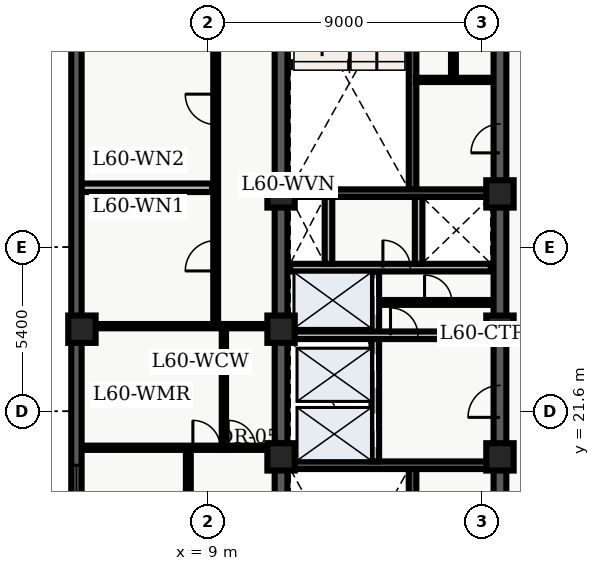
"""IFC4 building model, lengths in metres.
Left out: names, types, materials, properties, quantities, classifications, styles, units other than length and angle.
Written with IfcOpenShell. Run it as: python <this file> out.ifc"""

import sys

from ifc_helpers import new_model, entity, si_unit, converted_unit, direction, frame, origin_with_axes, origin_2d_with_axis, place, context, subcontext, project, spatial, polyline, rectangle, outline, extrude, element, fill, save


model = new_model("IFC4")
c1 = context("Model", 3, precision=1e-05, world=origin_with_axes(), true_north=direction((0.0, 1.0)))
c2 = subcontext(c1, "Body", "Model", "MODEL_VIEW")
j1 = project(units=[si_unit("LENGTHUNIT", "METRE"), converted_unit("PLANEANGLEUNIT", "DEGREE", entity("IfcPlaneAngleMeasure", 0.017), si_unit("PLANEANGLEUNIT", "RADIAN"), dimensions=[0, 0, 0, 0, 0, 0, 0])], contexts=[c1])
p1 = place(None, origin_with_axes())
s1 = spatial("IfcSite", under=j1, at=p1, CompositionType="ELEMENT")
p2 = place(p1, origin_with_axes())
s2 = spatial("IfcBuilding", under=s1, at=p2, CompositionType="ELEMENT")
p3 = place(p2, frame((0.0, 0.0, 244.2), z_axis=(0.0, 0.0, 1.0), x_axis=(1.0, 0.0, 0.0)))
s3 = spatial("IfcBuildingStorey", under=s2, at=p3, CompositionType="ELEMENT", Elevation=244.2)
p4 = place(p3, frame((11.4, 10.8, 0.0), z_axis=(0.0, 0.0, 1.0), x_axis=(0.0, 1.0, 0.0)))
e1 = element("IfcWall", 1, at=p4, inside=s3, PredefinedType="SHEAR", context=c2, shape_type="SweptSolid", body=[
    extrude(outline(polyline([(0.0, -0.21), (27.0, -0.21), (27.0, 0.21), (0.0, 0.21), (0.0, -0.21)])), origin_with_axes(), (0.0, 0.0, 1.0), 3.6),
])
p5 = place(p3, frame((18.6, 10.8, 0.0), z_axis=(0.0, 0.0, 1.0), x_axis=(0.0, 1.0, 0.0)))
e2 = element("IfcWall", 2, at=p5, inside=s3, PredefinedType="SHEAR", context=c2, shape_type="SweptSolid", body=[
    extrude(outline(polyline([(0.0, -0.21), (13.5, -0.21), (13.5, 0.21), (0.0, 0.21), (0.0, -0.21)])), origin_with_axes(), (0.0, 0.0, 1.0), 3.6),
])
p6 = place(p5, frame((1.3, 0.0, 0.0), z_axis=(0.0, 0.0, 1.0), x_axis=(1.0, 0.0, 0.0)))
e3 = element("IfcOpeningElement", 3, at=p6, cuts=e2, PredefinedType="OPENING", context=c2, shape_type="SweptSolid", body=[
    extrude(rectangle(XDim=1.1, YDim=0.44, at=origin_2d_with_axis()), origin_with_axes(), (0.0, 0.0, 1.0), 2.15),
])
p7 = place(p5, frame((3.4, 0.0, 0.0), z_axis=(0.0, 0.0, 1.0), x_axis=(1.0, 0.0, 0.0)))
e4 = element("IfcOpeningElement", 4, at=p7, cuts=e2, PredefinedType="OPENING", context=c2, shape_type="SweptSolid", body=[
    extrude(rectangle(XDim=1.1, YDim=0.44, at=origin_2d_with_axis()), origin_with_axes(), (0.0, 0.0, 1.0), 2.15),
])
p8 = place(p5, frame((11.125, 0.0, 0.0), z_axis=(0.0, 0.0, 1.0), x_axis=(1.0, 0.0, 0.0)))
e5 = element("IfcOpeningElement", 5, at=p8, cuts=e2, PredefinedType="OPENING", context=c2, shape_type="SweptSolid", body=[
    extrude(rectangle(XDim=1.05, YDim=0.44, at=origin_2d_with_axis()), origin_with_axes(), (0.0, 0.0, 1.0), 2.15),
])
p9 = place(p5, frame((6.675, 0.0, 0.0), z_axis=(0.0, 0.0, 1.0), x_axis=(1.0, 0.0, 0.0)))
e6 = element("IfcOpeningElement", 6, at=p9, cuts=e2, PredefinedType="OPENING", context=c2, shape_type="SweptSolid", body=[
    extrude(rectangle(XDim=0.95, YDim=0.44, at=origin_2d_with_axis()), origin_with_axes(), (0.0, 0.0, 1.0), 2.15),
])
p10 = place(p3, frame((18.6, 24.3, 0.0), z_axis=(0.0, 0.0, 1.0), x_axis=(0.0, 1.0, 0.0)))
e7 = element("IfcWall", 7, at=p10, inside=s3, PredefinedType="SHEAR", context=c2, shape_type="SweptSolid", body=[
    extrude(outline(polyline([(0.0, -0.21), (13.5, -0.21), (13.5, 0.21), (0.0, 0.21), (0.0, -0.21)])), origin_with_axes(), (0.0, 0.0, 1.0), 3.6),
])
p11 = place(p10, frame((6.275, 0.0, 0.0), z_axis=(0.0, 0.0, 1.0), x_axis=(1.0, 0.0, 0.0)))
e8 = element("IfcOpeningElement", 8, at=p11, cuts=e7, PredefinedType="OPENING", context=c2, shape_type="SweptSolid", body=[
    extrude(rectangle(XDim=0.95, YDim=0.44, at=origin_2d_with_axis()), origin_with_axes(), (0.0, 0.0, 1.0), 2.15),
])
p12 = place(p10, frame((10.875, 0.0, 0.0), z_axis=(0.0, 0.0, 1.0), x_axis=(1.0, 0.0, 0.0)))
e9 = element("IfcOpeningElement", 9, at=p12, cuts=e7, PredefinedType="OPENING", context=c2, shape_type="SweptSolid", body=[
    extrude(rectangle(XDim=0.95, YDim=0.44, at=origin_2d_with_axis()), origin_with_axes(), (0.0, 0.0, 1.0), 2.15),
])
p13 = place(p3, frame((15.725, 11.01, 0.0), z_axis=(0.0, 0.0, 1.0), x_axis=(0.0, 1.0, 0.0)))
e10 = element("IfcWall", 10, at=p13, inside=s3, PredefinedType="SHEAR", context=c2, shape_type="SweptSolid", body=[
    extrude(outline(polyline([(0.0, -0.125), (8.69, -0.125), (8.69, 0.125), (0.0, 0.125), (0.0, -0.125)])), origin_with_axes(), (0.0, 0.0, 1.0), 3.6),
])
p14 = place(p3, frame((11.61, 19.825, 0.0), z_axis=(0.0, 0.0, 1.0), x_axis=(1.0, 0.0, 0.0)))
e11 = element("IfcWall", 11, at=p14, inside=s3, PredefinedType="SHEAR", context=c2, shape_type="SweptSolid", body=[
    extrude(outline(polyline([(0.0, -0.125), (6.78, -0.125), (6.78, 0.125), (0.0, 0.125), (0.0, -0.125)])), origin_with_axes(), (0.0, 0.0, 1.0), 3.6),
])
p15 = place(p3, frame((15.725, 28.9, 0.0), z_axis=(0.0, 0.0, 1.0), x_axis=(0.0, 1.0, 0.0)))
e12 = element("IfcWall", 12, at=p15, inside=s3, PredefinedType="SHEAR", context=c2, shape_type="SweptSolid", body=[
    extrude(outline(polyline([(0.0, -0.125), (8.69, -0.125), (8.69, 0.125), (0.0, 0.125), (0.0, -0.125)])), origin_with_axes(), (0.0, 0.0, 1.0), 3.6),
])
p16 = place(p3, frame((11.61, 28.775, 0.0), z_axis=(0.0, 0.0, 1.0), x_axis=(1.0, 0.0, 0.0)))
e13 = element("IfcWall", 13, at=p16, inside=s3, PredefinedType="SHEAR", context=c2, shape_type="SweptSolid", body=[
    extrude(outline(polyline([(0.0, -0.125), (6.78, -0.125), (6.78, 0.125), (0.0, 0.125), (0.0, -0.125)])), origin_with_axes(), (0.0, 0.0, 1.0), 3.6),
])
p17 = place(p3, frame((14.5, 19.95, 0.0), z_axis=(0.0, 0.0, 1.0), x_axis=(0.0, 1.0, 0.0)))
e14 = element("IfcWall", 14, at=p17, inside=s3, PredefinedType="SOLIDWALL", context=c2, shape_type="SweptSolid", body=[
    extrude(outline(polyline([(0.0, -0.125), (6.25, -0.125), (6.25, 0.125), (0.0, 0.125), (0.0, -0.125)])), origin_with_axes(), (0.0, 0.0, 1.0), 2.64),
])
p18 = place(p17, frame((1.025, 0.0, 0.0), z_axis=(0.0, 0.0, 1.0), x_axis=(1.0, 0.0, 0.0)))
e15 = element("IfcOpeningElement", 15, at=p18, cuts=e14, PredefinedType="OPENING", context=c2, shape_type="SweptSolid", body=[
    extrude(rectangle(XDim=1.1, YDim=0.27, at=origin_2d_with_axis()), origin_with_axes(), (0.0, 0.0, 1.0), 2.15),
])
p19 = place(p17, frame((2.975, 0.0, 0.0), z_axis=(0.0, 0.0, 1.0), x_axis=(1.0, 0.0, 0.0)))
e16 = element("IfcOpeningElement", 16, at=p19, cuts=e14, PredefinedType="OPENING", context=c2, shape_type="SweptSolid", body=[
    extrude(rectangle(XDim=1.1, YDim=0.27, at=origin_2d_with_axis()), origin_with_axes(), (0.0, 0.0, 1.0), 2.15),
])
p20 = place(p17, frame((5.425, 0.0, 0.0), z_axis=(0.0, 0.0, 1.0), x_axis=(1.0, 0.0, 0.0)))
e17 = element("IfcOpeningElement", 17, at=p20, cuts=e14, PredefinedType="OPENING", context=c2, shape_type="SweptSolid", body=[
    extrude(rectangle(XDim=1.2, YDim=0.27, at=origin_2d_with_axis()), origin_with_axes(), (0.0, 0.0, 1.0), 2.15),
])
p21 = place(p3, frame((11.7, 24.1, 0.0), z_axis=(0.0, 0.0, 1.0), x_axis=(1.0, 0.0, 0.0)))
e18 = element("IfcWall", 18, at=p21, inside=s3, PredefinedType="SOLIDWALL", context=c2, shape_type="SweptSolid", body=[
    extrude(outline(polyline([(0.0, -0.125), (6.6, -0.125), (6.6, 0.125), (0.0, 0.125), (0.0, -0.125)])), origin_with_axes(), (0.0, 0.0, 1.0), 2.64),
])
p22 = place(p21, frame((3.75, 0.0, 0.0), z_axis=(0.0, 0.0, 1.0), x_axis=(1.0, 0.0, 0.0)))
e19 = element("IfcOpeningElement", 19, at=p22, cuts=e18, PredefinedType="OPENING", context=c2, shape_type="SweptSolid", body=[
    extrude(rectangle(XDim=0.9, YDim=0.27, at=origin_2d_with_axis()), origin_with_axes(), (0.0, 0.0, 1.0), 2.15),
])
p23 = place(p3, frame((11.7, 26.325, 0.0), z_axis=(0.0, 0.0, 1.0), x_axis=(1.0, 0.0, 0.0)))
e20 = element("IfcWall", 20, at=p23, inside=s3, PredefinedType="SOLIDWALL", context=c2, shape_type="SweptSolid", body=[
    extrude(outline(polyline([(0.0, -0.125), (6.6, -0.125), (6.6, 0.125), (0.0, 0.125), (0.0, -0.125)])), origin_with_axes(), (0.0, 0.0, 1.0), 2.64),
])
p24 = place(p23, frame((3.5, 0.0, 0.0), z_axis=(0.0, 0.0, 1.0), x_axis=(1.0, 0.0, 0.0)))
e21 = element("IfcOpeningElement", 21, at=p24, cuts=e20, PredefinedType="OPENING", context=c2, shape_type="SweptSolid", body=[
    extrude(rectangle(XDim=0.9, YDim=0.27, at=origin_2d_with_axis()), origin_with_axes(), (0.0, 0.0, 1.0), 2.15),
])
for number, where, z_axis, x_axis in (
    (22, (12.96, 26.45, 0.0), (0.0, 0.0, 1.0), (0.0, 1.0, 0.0)),
    (23, (15.925, 26.45, 0.0), (0.0, 0.0, 1.0), (0.0, 1.0, 0.0)),
):
    element("IfcWall", number, at=place(p3, frame(where, z_axis=z_axis, x_axis=x_axis)), inside=s3, PredefinedType="SOLIDWALL", context=c2, shape_type="SweptSolid", body=[
        extrude(outline(polyline([(0.0, -0.125), (2.2, -0.125), (2.2, 0.125), (0.0, 0.125), (0.0, -0.125)])), origin_with_axes(), (0.0, 0.0, 1.0), 2.64),
    ])
for number, where, z_axis, x_axis in (
    (24, (11.4, 20.1, 0.0), (0.0, 0.0, 1.0), (1.0, 0.0, 0.0)),
    (25, (11.4, 24.3, 0.0), (0.0, 0.0, 1.0), (1.0, 0.0, 0.0)),
    (26, (11.4, 28.75, 0.0), (0.0, 0.0, 1.0), (1.0, 0.0, 0.0)),
    (27, (18.6, 20.1, 0.0), (0.0, 0.0, 1.0), (1.0, 0.0, 0.0)),
    (28, (18.6, 24.3, 0.0), (0.0, 0.0, 1.0), (1.0, 0.0, 0.0)),
    (29, (18.6, 28.75, 0.0), (0.0, 0.0, 1.0), (1.0, 0.0, 0.0)),
    (30, (4.85, 24.3, 0.0), (0.0, 0.0, 1.0), (1.0, 0.0, 0.0)),
):
    element("IfcColumn", number, at=place(p3, frame(where, z_axis=z_axis, x_axis=x_axis)), inside=s3, PredefinedType="COLUMN", context=c2, shape_type="SweptSolid", body=[
        extrude(rectangle(XDim=0.9, YDim=0.9, at=origin_2d_with_axis()), origin_with_axes(), (0.0, 0.0, 1.0), 3.9),
    ])
p25 = place(p3, frame((14.62, 25.18, 0.0), z_axis=(0.0, 0.0, 1.0), x_axis=(1.0, 0.0, 0.0)))
e31 = element("IfcWall", 31, at=p25, inside=s3, PredefinedType="PARTITIONING", context=c2, shape_type="SweptSolid", body=[
    extrude(outline(polyline([(0.0, -0.08), (3.68, -0.08), (3.68, 0.08), (0.0, 0.08), (0.0, -0.08)])), origin_with_axes(), (0.0, 0.0, 1.0), 2.64),
])
p26 = place(p25, frame((1.95, 0.0, 0.0), z_axis=(0.0, 0.0, 1.0), x_axis=(1.0, 0.0, 0.0)))
e32 = element("IfcOpeningElement", 32, at=p26, cuts=e31, PredefinedType="OPENING", context=c2, shape_type="SweptSolid", body=[
    extrude(rectangle(XDim=0.9, YDim=0.18, at=origin_2d_with_axis()), origin_with_axes(), (0.0, 0.0, 1.0), 2.15),
])
p27 = place(p3, frame((15.84, 32.5, 0.0), z_axis=(0.0, 0.0, 1.0), x_axis=(1.0, 0.0, 0.0)))
e33 = element("IfcWall", 33, at=p27, inside=s3, PredefinedType="PARTITIONING", context=c2, shape_type="SweptSolid", body=[
    extrude(outline(polyline([(0.0, -0.07), (2.46, -0.07), (2.46, 0.07), (0.0, 0.07), (0.0, -0.07)])), origin_with_axes(), (0.0, 0.0, 1.0), 2.64),
])
p28 = place(p3, frame((17.07, 32.58, 0.0), z_axis=(0.0, 0.0, 1.0), x_axis=(0.0, 1.0, 0.0)))
e34 = element("IfcWall", 34, at=p28, inside=s3, PredefinedType="PARTITIONING", context=c2, shape_type="SweptSolid", body=[
    extrude(outline(polyline([(0.0, -0.08), (4.92, -0.08), (4.92, 0.08), (0.0, 0.08), (0.0, -0.08)])), origin_with_axes(), (0.0, 0.0, 1.0), 2.64),
])
p29 = place(p28, frame((2.45, 0.0, 0.0), z_axis=(0.0, 0.0, 1.0), x_axis=(1.0, 0.0, 0.0)))
e35 = element("IfcOpeningElement", 35, at=p29, cuts=e34, PredefinedType="OPENING", context=c2, shape_type="SweptSolid", body=[
    extrude(rectangle(XDim=0.9, YDim=0.18, at=origin_2d_with_axis()), origin_with_axes(), (0.0, 0.0, 1.0), 2.15),
])
p30 = place(p3, frame((9.52, 20.4, 0.0), z_axis=(0.0, 0.0, 1.0), x_axis=(0.0, 1.0, 0.0)))
e36 = element("IfcWall", 36, at=p30, inside=s3, PredefinedType="PARTITIONING", context=c2, shape_type="SweptSolid", body=[
    extrude(outline(polyline([(0.0, -0.07), (4.0, -0.07), (4.0, 0.07), (0.0, 0.07), (0.0, -0.07)])), origin_with_axes(), (0.0, 0.0, 1.0), 2.64),
])
p31 = place(p3, frame((9.52, 20.4, 0.0), z_axis=(0.0, 0.0, 1.0), x_axis=(1.0, 0.0, 0.0)))
e37 = element("IfcWall", 37, at=p31, inside=s3, PredefinedType="PARTITIONING", context=c2, shape_type="SweptSolid", body=[
    extrude(outline(polyline([(0.0, -0.07), (1.58, -0.07), (1.58, 0.07), (0.0, 0.07), (0.0, -0.07)])), origin_with_axes(), (0.0, 0.0, 1.0), 2.64),
])
p32 = place(p31, frame((0.59, 0.0, 0.0), z_axis=(0.0, 0.0, 1.0), x_axis=(1.0, 0.0, 0.0)))
e38 = element("IfcOpeningElement", 38, at=p32, cuts=e37, PredefinedType="OPENING", context=c2, shape_type="SweptSolid", body=[
    extrude(rectangle(XDim=0.9, YDim=0.16, at=origin_2d_with_axis()), origin_with_axes(), (0.0, 0.0, 1.0), 2.15),
])
p33 = place(p3, frame((9.52, 24.4, 0.0), z_axis=(0.0, 0.0, 1.0), x_axis=(1.0, 0.0, 0.0)))
e39 = element("IfcWall", 39, at=p33, inside=s3, PredefinedType="PARTITIONING", context=c2, shape_type="SweptSolid", body=[
    extrude(outline(polyline([(0.0, -0.07), (1.58, -0.07), (1.58, 0.07), (0.0, 0.07), (0.0, -0.07)])), origin_with_axes(), (0.0, 0.0, 1.0), 2.64),
])
p34 = place(p3, frame((8.35, 7.8, 0.0), z_axis=(0.0, 0.0, 1.0), x_axis=(0.0, 1.0, 0.0)))
e40 = element("IfcWall", 40, at=p34, inside=s3, PredefinedType="PARTITIONING", context=c2, shape_type="SweptSolid", body=[
    extrude(outline(polyline([(0.0, -0.08), (12.6, -0.08), (12.6, 0.08), (0.0, 0.08), (0.0, -0.08)])), origin_with_axes(), (0.0, 0.0, 1.0), 2.64),
])
p35 = place(p34, frame((2.897, 0.0, 0.0), z_axis=(0.0, 0.0, 1.0), x_axis=(1.0, 0.0, 0.0)))
e41 = element("IfcOpeningElement", 41, at=p35, cuts=e40, PredefinedType="OPENING", context=c2, shape_type="SweptSolid", body=[
    extrude(rectangle(XDim=1.0, YDim=0.18, at=origin_2d_with_axis()), origin_with_axes(), (0.0, 0.0, 1.0), 2.15),
])
p36 = place(p34, frame((9.092, 0.0, 0.0), z_axis=(0.0, 0.0, 1.0), x_axis=(1.0, 0.0, 0.0)))
e42 = element("IfcOpeningElement", 42, at=p36, cuts=e40, PredefinedType="OPENING", context=c2, shape_type="SweptSolid", body=[
    extrude(rectangle(XDim=1.0, YDim=0.18, at=origin_2d_with_axis()), origin_with_axes(), (0.0, 0.0, 1.0), 2.15),
])
p37 = place(p3, frame((9.25, 24.4, 0.0), z_axis=(0.0, 0.0, 1.0), x_axis=(0.0, 1.0, 0.0)))
e43 = element("IfcWall", 43, at=p37, inside=s3, PredefinedType="PARTITIONING", context=c2, shape_type="SweptSolid", body=[
    extrude(outline(polyline([(0.0, -0.08), (16.1, -0.08), (16.1, 0.08), (0.0, 0.08), (0.0, -0.08)])), origin_with_axes(), (0.0, 0.0, 1.0), 2.64),
])
p38 = place(p37, frame((2.316, 0.0, 0.0), z_axis=(0.0, 0.0, 1.0), x_axis=(1.0, 0.0, 0.0)))
e44 = element("IfcOpeningElement", 44, at=p38, cuts=e43, PredefinedType="OPENING", context=c2, shape_type="SweptSolid", body=[
    extrude(rectangle(XDim=1.0, YDim=0.18, at=origin_2d_with_axis()), origin_with_axes(), (0.0, 0.0, 1.0), 2.15),
])
p39 = place(p37, frame((7.131, 0.0, 0.0), z_axis=(0.0, 0.0, 1.0), x_axis=(1.0, 0.0, 0.0)))
e45 = element("IfcOpeningElement", 45, at=p39, cuts=e43, PredefinedType="OPENING", context=c2, shape_type="SweptSolid", body=[
    extrude(rectangle(XDim=1.0, YDim=0.18, at=origin_2d_with_axis()), origin_with_axes(), (0.0, 0.0, 1.0), 2.15),
])
p40 = place(p37, frame((12.841, 0.0, 0.0), z_axis=(0.0, 0.0, 1.0), x_axis=(1.0, 0.0, 0.0)))
e46 = element("IfcOpeningElement", 46, at=p40, cuts=e43, PredefinedType="OPENING", context=c2, shape_type="SweptSolid", body=[
    extrude(rectangle(XDim=1.0, YDim=0.18, at=origin_2d_with_axis()), origin_with_axes(), (0.0, 0.0, 1.0), 2.15),
])
p41 = place(p3, frame((4.835, 20.4, 0.0), z_axis=(0.0, 0.0, 1.0), x_axis=(1.0, 0.0, 0.0)))
e47 = element("IfcWall", 47, at=p41, inside=s3, PredefinedType="PARTITIONING", context=c2, shape_type="SweptSolid", body=[
    extrude(outline(polyline([(0.0, -0.07), (4.685, -0.07), (4.685, 0.07), (0.0, 0.07), (0.0, -0.07)])), origin_with_axes(), (0.0, 0.0, 1.0), 2.64),
])
p42 = place(p41, frame((4.115, 0.0, 0.0), z_axis=(0.0, 0.0, 1.0), x_axis=(1.0, 0.0, 0.0)))
e48 = element("IfcOpeningElement", 48, at=p42, cuts=e47, PredefinedType="OPENING", context=c2, shape_type="SweptSolid", body=[
    extrude(rectangle(XDim=0.9, YDim=0.16, at=origin_2d_with_axis()), origin_with_axes(), (0.0, 0.0, 1.0), 2.15),
])
p43 = place(p3, frame((4.835, 24.4, 0.0), z_axis=(0.0, 0.0, 1.0), x_axis=(1.0, 0.0, 0.0)))
e49 = element("IfcWall", 49, at=p43, inside=s3, PredefinedType="PARTITIONING", context=c2, shape_type="SweptSolid", body=[
    extrude(outline(polyline([(0.0, -0.07), (4.685, -0.07), (4.685, 0.07), (0.0, 0.07), (0.0, -0.07)])), origin_with_axes(), (0.0, 0.0, 1.0), 2.64),
])
p44 = place(p3, frame((4.835, 28.952, 0.0), z_axis=(0.0, 0.0, 1.0), x_axis=(1.0, 0.0, 0.0)))
e50 = element("IfcWall", 50, at=p44, inside=s3, PredefinedType="PARTITIONING", context=c2, shape_type="SweptSolid", body=[
    extrude(outline(polyline([(0.0, -0.14), (4.295, -0.14), (4.295, 0.14), (0.0, 0.14), (0.0, -0.14)])), origin_with_axes(), (0.0, 0.0, 1.0), 2.64),
])
p45 = place(p3, frame((4.67, 2.74, 0.0), z_axis=(0.0, 0.0, 1.0), x_axis=(0.0, 1.0, 0.0)))
e51 = element("IfcWall", 51, at=p45, inside=s3, PredefinedType="SOLIDWALL", context=c2, shape_type="SweptSolid", body=[
    extrude(outline(polyline([(0.0, -0.17), (43.46, -0.17), (43.46, 0.17), (0.0, 0.17), (0.0, -0.17)])), origin_with_axes(), (0.0, 0.0, 1.0), 3.6),
])
p46 = place(p45, frame((2.948, 0.0, 0.45), z_axis=(0.0, 0.0, 1.0), x_axis=(1.0, 0.0, 0.0)))
e52 = element("IfcOpeningElement", 52, at=p46, cuts=e51, PredefinedType="OPENING", context=c2, shape_type="SweptSolid", body=[
    extrude(rectangle(XDim=1.8, YDim=0.36, at=origin_2d_with_axis()), origin_with_axes(), (0.0, 0.0, 1.0), 2.1),
])
p47 = place(p45, frame((12.339, 0.0, 0.45), z_axis=(0.0, 0.0, 1.0), x_axis=(1.0, 0.0, 0.0)))
e53 = element("IfcOpeningElement", 53, at=p47, cuts=e51, PredefinedType="OPENING", context=c2, shape_type="SweptSolid", body=[
    extrude(rectangle(XDim=1.8, YDim=0.36, at=origin_2d_with_axis()), origin_with_axes(), (0.0, 0.0, 1.0), 2.1),
])
p48 = place(p45, frame((16.184, 0.0, 0.45), z_axis=(0.0, 0.0, 1.0), x_axis=(1.0, 0.0, 0.0)))
e54 = element("IfcOpeningElement", 54, at=p48, cuts=e51, PredefinedType="OPENING", context=c2, shape_type="SweptSolid", body=[
    extrude(rectangle(XDim=1.8, YDim=0.36, at=origin_2d_with_axis()), origin_with_axes(), (0.0, 0.0, 1.0), 2.1),
])
p49 = place(p45, frame((40.062, 0.0, 0.45), z_axis=(0.0, 0.0, 1.0), x_axis=(1.0, 0.0, 0.0)))
e55 = element("IfcOpeningElement", 55, at=p49, cuts=e51, PredefinedType="OPENING", context=c2, shape_type="SweptSolid", body=[
    extrude(rectangle(XDim=1.8, YDim=0.36, at=origin_2d_with_axis()), origin_with_axes(), (0.0, 0.0, 1.0), 2.1),
])
p50 = place(p17, frame((1.025, 0.0, 0.0), z_axis=(0.0, 0.0, 1.0), x_axis=(1.0, 0.0, 0.0)))
e56 = element("IfcDoor", 56, at=p50, inside=s3, OperationType="SLIDING_TO_LEFT", PredefinedType="DOOR", context=c2, shape_type="SweptSolid", body=[
    extrude(rectangle(XDim=1.1, YDim=0.09, at=origin_2d_with_axis()), origin_with_axes(), (0.0, 0.0, 1.0), 2.15),
])
fill(e15, e56)
p51 = place(p17, frame((2.975, 0.0, 0.0), z_axis=(0.0, 0.0, 1.0), x_axis=(1.0, 0.0, 0.0)))
e57 = element("IfcDoor", 57, at=p51, inside=s3, OperationType="SLIDING_TO_RIGHT", PredefinedType="DOOR", context=c2, shape_type="SweptSolid", body=[
    extrude(rectangle(XDim=1.1, YDim=0.09, at=origin_2d_with_axis()), origin_with_axes(), (0.0, 0.0, 1.0), 2.15),
])
fill(e16, e57)
p52 = place(p17, frame((5.425, 0.0, 0.0), z_axis=(0.0, 0.0, 1.0), x_axis=(1.0, 0.0, 0.0)))
e58 = element("IfcDoor", 58, at=p52, inside=s3, OperationType="DOUBLE_DOOR_SLIDING", PredefinedType="DOOR", context=c2, shape_type="SweptSolid", body=[
    extrude(rectangle(XDim=1.2, YDim=0.09, at=origin_2d_with_axis()), origin_with_axes(), (0.0, 0.0, 1.0), 2.15),
])
fill(e17, e58)
p53 = place(p5, frame((11.125, 0.0, 0.0), z_axis=(0.0, 0.0, 1.0), x_axis=(1.0, 0.0, 0.0)))
e59 = element("IfcDoor", 59, at=p53, inside=s3, OperationType="SINGLE_SWING_LEFT", PredefinedType="DOOR", context=c2, shape_type="SweptSolid", body=[
    extrude(rectangle(XDim=1.05, YDim=0.09, at=origin_2d_with_axis()), origin_with_axes(), (0.0, 0.0, 1.0), 2.15),
])
fill(e5, e59)
p54 = place(p23, frame((3.5, 0.0, 0.0), z_axis=(0.0, 0.0, 1.0), x_axis=(1.0, 0.0, 0.0)))
e60 = element("IfcDoor", 60, at=p54, inside=s3, OperationType="SINGLE_SWING_LEFT", PredefinedType="DOOR", context=c2, shape_type="SweptSolid", body=[
    extrude(rectangle(XDim=0.9, YDim=0.09, at=origin_2d_with_axis()), origin_with_axes(), (0.0, 0.0, 1.0), 2.15),
])
fill(e21, e60)
p55 = place(p21, frame((3.75, 0.0, 0.0), z_axis=(0.0, 0.0, 1.0), x_axis=(1.0, 0.0, 0.0)))
e61 = element("IfcDoor", 61, at=p55, inside=s3, OperationType="SINGLE_SWING_LEFT", PredefinedType="DOOR", context=c2, shape_type="SweptSolid", body=[
    extrude(rectangle(XDim=0.9, YDim=0.09, at=origin_2d_with_axis()), origin_with_axes(), (0.0, 0.0, 1.0), 2.15),
])
fill(e19, e61)
p56 = place(p25, frame((1.95, 0.0, 0.0), z_axis=(0.0, 0.0, 1.0), x_axis=(1.0, 0.0, 0.0)))
e62 = element("IfcDoor", 62, at=p56, inside=s3, OperationType="SINGLE_SWING_LEFT", PredefinedType="DOOR", context=c2, shape_type="SweptSolid", body=[
    extrude(rectangle(XDim=0.9, YDim=0.09, at=origin_2d_with_axis()), origin_with_axes(), (0.0, 0.0, 1.0), 2.15),
])
fill(e32, e62)
p57 = place(p10, frame((6.275, 0.0, 0.0), z_axis=(0.0, 0.0, 1.0), x_axis=(1.0, 0.0, 0.0)))
e63 = element("IfcDoor", 63, at=p57, inside=s3, OperationType="SINGLE_SWING_LEFT", PredefinedType="DOOR", context=c2, shape_type="SweptSolid", body=[
    extrude(rectangle(XDim=0.95, YDim=0.09, at=origin_2d_with_axis()), origin_with_axes(), (0.0, 0.0, 1.0), 2.15),
])
fill(e8, e63)
p58 = place(p31, frame((0.59, 0.0, 0.0), z_axis=(0.0, 0.0, 1.0), x_axis=(1.0, 0.0, 0.0)))
e64 = element("IfcDoor", 64, at=p58, inside=s3, OperationType="SINGLE_SWING_LEFT", PredefinedType="DOOR", context=c2, shape_type="SweptSolid", body=[
    extrude(rectangle(XDim=0.9, YDim=0.084, at=origin_2d_with_axis()), origin_with_axes(), (0.0, 0.0, 1.0), 2.15),
])
fill(e38, e64)
p59 = place(p41, frame((4.115, 0.0, 0.0), z_axis=(0.0, 0.0, 1.0), x_axis=(1.0, 0.0, 0.0)))
e65 = element("IfcDoor", 65, at=p59, inside=s3, OperationType="SINGLE_SWING_LEFT", PredefinedType="DOOR", context=c2, shape_type="SweptSolid", body=[
    extrude(rectangle(XDim=0.9, YDim=0.084, at=origin_2d_with_axis()), origin_with_axes(), (0.0, 0.0, 1.0), 2.15),
])
fill(e48, e65)
p60 = place(p37, frame((2.316, 0.0, 0.0), z_axis=(0.0, 0.0, 1.0), x_axis=(1.0, 0.0, 0.0)))
e66 = element("IfcDoor", 66, at=p60, inside=s3, OperationType="SINGLE_SWING_LEFT", PredefinedType="DOOR", context=c2, shape_type="SweptSolid", body=[
    extrude(rectangle(XDim=1.0, YDim=0.09, at=origin_2d_with_axis()), origin_with_axes(), (0.0, 0.0, 1.0), 2.15),
])
fill(e44, e66)
p61 = place(p37, frame((7.131, 0.0, 0.0), z_axis=(0.0, 0.0, 1.0), x_axis=(1.0, 0.0, 0.0)))
e67 = element("IfcDoor", 67, at=p61, inside=s3, OperationType="SINGLE_SWING_RIGHT", PredefinedType="DOOR", context=c2, shape_type="SweptSolid", body=[
    extrude(rectangle(XDim=1.0, YDim=0.09, at=origin_2d_with_axis()), origin_with_axes(), (0.0, 0.0, 1.0), 2.15),
])
fill(e45, e67)
p62 = place(p45, frame((16.184, 0.0, 0.45), z_axis=(0.0, 0.0, 1.0), x_axis=(1.0, 0.0, 0.0)))
e68 = element("IfcWindow", 68, at=p62, inside=s3, PredefinedType="WINDOW", context=c2, shape_type="SweptSolid", body=[
    extrude(rectangle(XDim=1.8, YDim=0.09, at=origin_2d_with_axis()), origin_with_axes(), (0.0, 0.0, 1.0), 2.1),
])
fill(e54, e68)
save(model, sys.argv[1])
